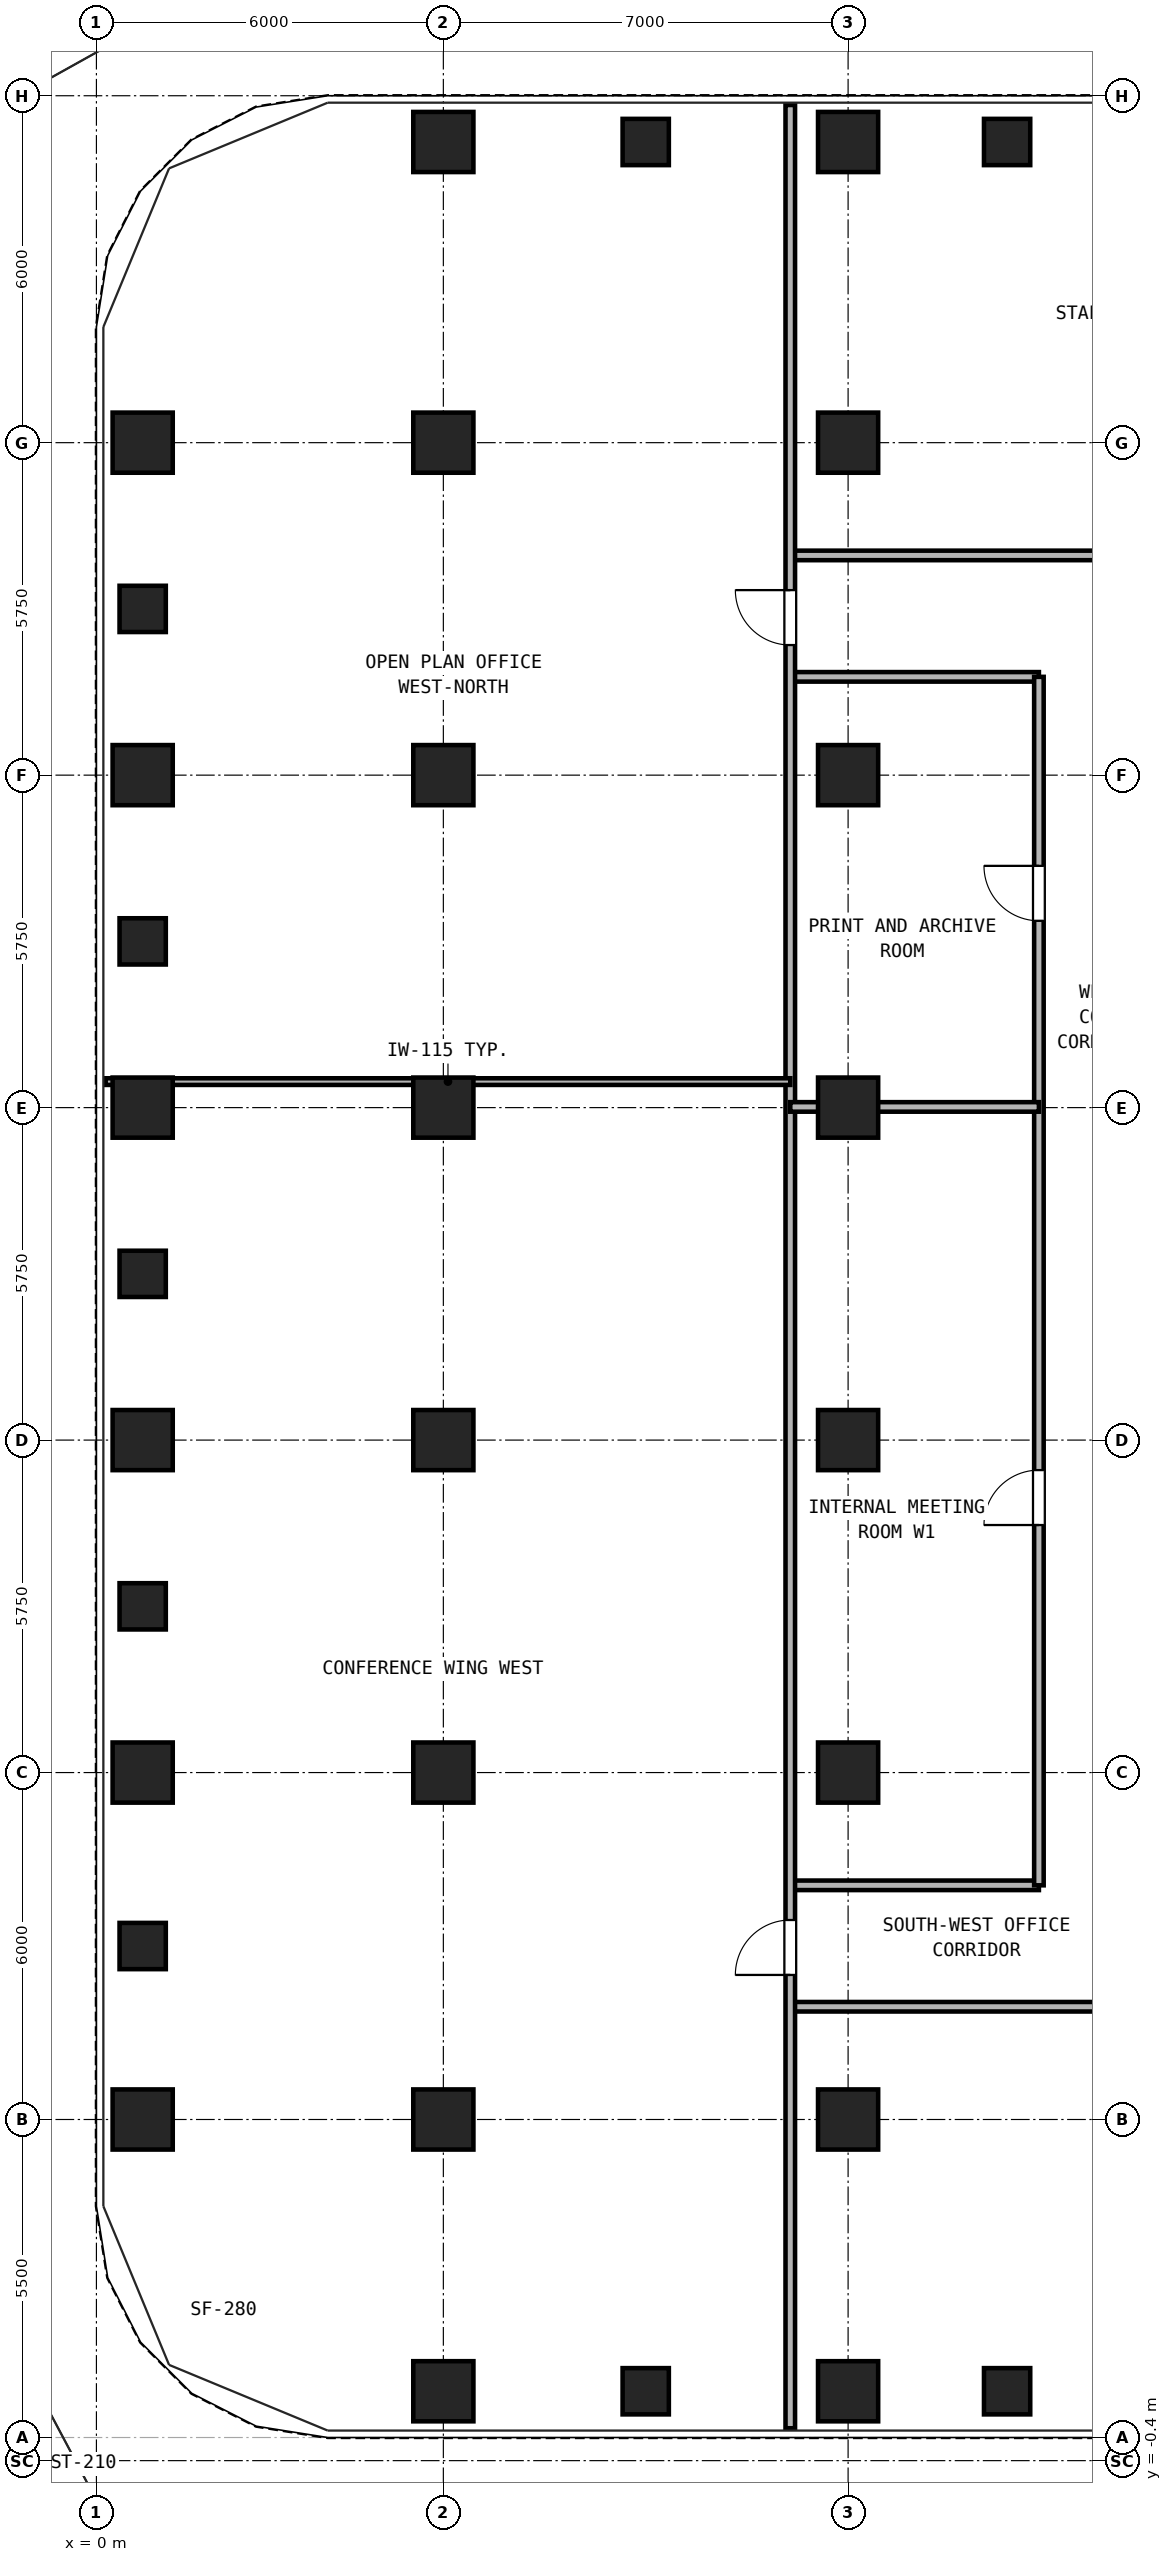
"""IFC4 building model, lengths in metres.
Left out: names, types, materials, properties, quantities, classifications, styles, units other than length and angle.
Written with IfcOpenShell. Run it as: python <this file> out.ifc"""

import sys

from ifc_helpers import new_model, si_unit, direction, frame, frame_2d, origin, origin_2d, place, context, subcontext, project, spatial, rectangle, hollow_rectangle, extrude, source, transform, mapped, element, fill, save


model = new_model("IFC4")
c1 = context("Model", 3, precision=1e-05, world=origin(), true_north=direction((0.0, 1.0)))
c2 = subcontext(c1, "Body", "Model", "MODEL_VIEW")
j1 = project(units=[si_unit("LENGTHUNIT", "METRE"), si_unit("PLANEANGLEUNIT", "RADIAN")], contexts=[c1])
p1 = place(None, origin())
s1 = spatial("IfcSite", under=j1, at=p1, CompositionType="ELEMENT")
p2 = place(p1, origin())
s2 = spatial("IfcBuilding", under=s1, at=p2, CompositionType="ELEMENT")
p3 = place(p2, frame((0.0, 0.0, 58.5)))
s3 = spatial("IfcBuildingStorey", under=s2, at=p3, CompositionType="ELEMENT", Elevation=58.5)
m1 = source(origin(), c2, "Body", "SweptSolid", [
    extrude(hollow_rectangle(XDim=1.04, YDim=1.04, WallThickness=0.065, at=origin_2d()), origin(), (0.0, 0.0, 1.0), 3.32),
])
for number, where, z_axis, x_axis in (
    (1, (6.0, 0.8, 0.0), (0.0, 0.0, 1.0), (1.0, 0.0, 0.0)),
    (2, (6.0, 39.7, 0.0), (0.0, 0.0, 1.0), (1.0, 0.0, 0.0)),
    (3, (13.0, 0.8, 0.0), (0.0, 0.0, 1.0), (1.0, 0.0, 0.0)),
    (4, (13.0, 39.7, 0.0), (0.0, 0.0, 1.0), (1.0, 0.0, 0.0)),
    (5, (0.8, 5.5, 0.0), (0.0, 0.0, 1.0), (1.0, 0.0, 0.0)),
    (6, (0.8, 11.5, 0.0), (0.0, 0.0, 1.0), (1.0, 0.0, 0.0)),
    (7, (0.8, 17.25, 0.0), (0.0, 0.0, 1.0), (1.0, 0.0, 0.0)),
    (8, (0.8, 23.0, 0.0), (0.0, 0.0, 1.0), (1.0, 0.0, 0.0)),
    (9, (0.8, 28.75, 0.0), (0.0, 0.0, 1.0), (1.0, 0.0, 0.0)),
    (10, (0.8, 34.5, 0.0), (0.0, 0.0, 1.0), (1.0, 0.0, 0.0)),
    (11, (6.0, 5.5, 0.0), (0.0, 0.0, 1.0), (1.0, 0.0, 0.0)),
    (12, (6.0, 11.5, 0.0), (0.0, 0.0, 1.0), (1.0, 0.0, 0.0)),
    (13, (6.0, 17.25, 0.0), (0.0, 0.0, 1.0), (1.0, 0.0, 0.0)),
    (14, (6.0, 23.0, 0.0), (0.0, 0.0, 1.0), (1.0, 0.0, 0.0)),
    (15, (6.0, 28.75, 0.0), (0.0, 0.0, 1.0), (1.0, 0.0, 0.0)),
    (16, (6.0, 34.5, 0.0), (0.0, 0.0, 1.0), (1.0, 0.0, 0.0)),
    (17, (13.0, 5.5, 0.0), (0.0, 0.0, 1.0), (1.0, 0.0, 0.0)),
    (18, (13.0, 11.5, 0.0), (0.0, 0.0, 1.0), (1.0, 0.0, 0.0)),
    (19, (13.0, 17.25, 0.0), (0.0, 0.0, 1.0), (1.0, 0.0, 0.0)),
    (20, (13.0, 23.0, 0.0), (0.0, 0.0, 1.0), (1.0, 0.0, 0.0)),
    (21, (13.0, 28.75, 0.0), (0.0, 0.0, 1.0), (1.0, 0.0, 0.0)),
    (22, (13.0, 34.5, 0.0), (0.0, 0.0, 1.0), (1.0, 0.0, 0.0)),
):
    element("IfcColumn", number, at=place(p3, frame(where, z_axis=z_axis, x_axis=x_axis)), inside=s3, PredefinedType="COLUMN", context=c2, shape_type="MappedRepresentation", body=[
        mapped(m1, transform((0.0, 0.0, 0.0), x_axis=(1.0, 0.0, 0.0), y_axis=(0.0, 1.0, 0.0), z_axis=(0.0, 0.0, 1.0), scale=1.0)),
    ])
m2 = source(origin(), c2, "Body", "SweptSolid", [
    extrude(hollow_rectangle(XDim=0.8, YDim=0.8, WallThickness=0.045, at=origin_2d()), origin(), (0.0, 0.0, 1.0), 3.32),
])
for number, where, z_axis, x_axis in (
    (23, (9.5, 0.8, 0.0), (0.0, 0.0, 1.0), (1.0, 0.0, 0.0)),
    (24, (9.5, 39.7, 0.0), (0.0, 0.0, 1.0), (1.0, 0.0, 0.0)),
    (25, (15.75, 0.8, 0.0), (0.0, 0.0, 1.0), (1.0, 0.0, 0.0)),
    (26, (15.75, 39.7, 0.0), (0.0, 0.0, 1.0), (1.0, 0.0, 0.0)),
    (27, (0.8, 8.5, 0.0), (0.0, 0.0, 1.0), (1.0, 0.0, 0.0)),
    (28, (0.8, 14.375, 0.0), (0.0, 0.0, 1.0), (1.0, 0.0, 0.0)),
    (29, (0.8, 20.125, 0.0), (0.0, 0.0, 1.0), (1.0, 0.0, 0.0)),
    (30, (0.8, 25.875, 0.0), (0.0, 0.0, 1.0), (1.0, 0.0, 0.0)),
    (31, (0.8, 31.625, 0.0), (0.0, 0.0, 1.0), (1.0, 0.0, 0.0)),
):
    element("IfcColumn", number, at=place(p3, frame(where, z_axis=z_axis, x_axis=x_axis)), inside=s3, PredefinedType="COLUMN", context=c2, shape_type="MappedRepresentation", body=[
        mapped(m2, transform((0.0, 0.0, 0.0), x_axis=(1.0, 0.0, 0.0), y_axis=(0.0, 1.0, 0.0), z_axis=(0.0, 0.0, 1.0), scale=1.0)),
    ])
p4 = place(p3, frame((12.0, 7.45, 0.0), z_axis=(0.0, 0.0, 1.0), x_axis=(1.0, 0.0, 0.0)))
e32 = element("IfcWall", 32, at=p4, inside=s3, PredefinedType="PARTITIONING", context=c2, shape_type="SweptSolid", body=[
    extrude(rectangle(XDim=23.0, YDim=0.165, at=frame_2d((11.5, 0.0))), origin(), (0.0, 0.0, 1.0), 3.32),
])
p5 = place(p4, frame((7.5, 0.0, 0.0)))
e33 = element("IfcOpeningElement", 33, at=p5, cuts=e32, PredefinedType="OPENING", context=c2, shape_type="SweptSolid", body=[
    extrude(rectangle(XDim=0.95, YDim=2.15, at=frame_2d((0.475, 1.075))), frame((0.0, 0.093, 0.0), z_axis=(0.0, -1.0, 0.0), x_axis=(1.0, 0.0, 0.0)), (0.0, 0.0, 1.0), 0.185),
])
p6 = place(p4, frame((17.9, 0.0, 0.0)))
e34 = element("IfcOpeningElement", 34, at=p6, cuts=e32, PredefinedType="OPENING", context=c2, shape_type="SweptSolid", body=[
    extrude(rectangle(XDim=0.95, YDim=2.15, at=frame_2d((0.475, 1.075))), frame((0.0, 0.093, 0.0), z_axis=(0.0, -1.0, 0.0), x_axis=(1.0, 0.0, 0.0)), (0.0, 0.0, 1.0), 0.185),
])
p7 = place(p4, frame((21.4, 0.0, 0.0)))
e35 = element("IfcOpeningElement", 35, at=p7, cuts=e32, PredefinedType="OPENING", context=c2, shape_type="SweptSolid", body=[
    extrude(rectangle(XDim=0.92, YDim=2.1, at=frame_2d((0.46, 1.05))), frame((0.0, 0.093, 0.0), z_axis=(0.0, -1.0, 0.0), x_axis=(1.0, 0.0, 0.0)), (0.0, 0.0, 1.0), 0.185),
])
p8 = place(p3, frame((12.0, 32.55, 0.0), z_axis=(0.0, 0.0, 1.0), x_axis=(1.0, 0.0, 0.0)))
e36 = element("IfcWall", 36, at=p8, inside=s3, PredefinedType="PARTITIONING", context=c2, shape_type="SweptSolid", body=[
    extrude(rectangle(XDim=23.0, YDim=0.165, at=frame_2d((11.5, 0.0))), origin(), (0.0, 0.0, 1.0), 3.32),
])
p9 = place(p8, frame((5.75, 0.0, 0.0)))
e37 = element("IfcOpeningElement", 37, at=p9, cuts=e36, PredefinedType="OPENING", context=c2, shape_type="SweptSolid", body=[
    extrude(rectangle(XDim=0.95, YDim=2.15, at=frame_2d((0.475, 1.075))), frame((0.0, 0.093, 0.0), z_axis=(0.0, -1.0, 0.0), x_axis=(1.0, 0.0, 0.0)), (0.0, 0.0, 1.0), 0.185),
])
p10 = place(p8, frame((17.25, 0.0, 0.0)))
e38 = element("IfcOpeningElement", 38, at=p10, cuts=e36, PredefinedType="OPENING", context=c2, shape_type="SweptSolid", body=[
    extrude(rectangle(XDim=0.95, YDim=2.15, at=frame_2d((0.475, 1.075))), frame((0.0, 0.093, 0.0), z_axis=(0.0, -1.0, 0.0), x_axis=(1.0, 0.0, 0.0)), (0.0, 0.0, 1.0), 0.185),
])
for number, where, z_axis, x_axis in (
    (39, (12.0, 9.55, 0.0), (0.0, 0.0, 1.0), (1.0, 0.0, 0.0)),
    (40, (12.0, 30.45, 0.0), (0.0, 0.0, 1.0), (1.0, 0.0, 0.0)),
):
    element("IfcWall", number, at=place(p3, frame(where, z_axis=z_axis, x_axis=x_axis)), inside=s3, PredefinedType="PARTITIONING", context=c2, shape_type="SweptSolid", body=[
        extrude(rectangle(XDim=4.3, YDim=0.165, at=frame_2d((2.15, 0.0))), origin(), (0.0, 0.0, 1.0), 3.32),
    ])
p11 = place(p3, frame((16.3, 9.55, 0.0), z_axis=(0.0, 0.0, 1.0), x_axis=(0.0, 1.0, 0.0)))
e41 = element("IfcWall", 41, at=p11, inside=s3, PredefinedType="PARTITIONING", context=c2, shape_type="SweptSolid", body=[
    extrude(rectangle(XDim=20.9, YDim=0.165, at=frame_2d((10.45, 0.0))), origin(), (0.0, 0.0, 1.0), 3.32),
])
p12 = place(p11, frame((6.231, 0.0, 0.0)))
e42 = element("IfcOpeningElement", 42, at=p12, cuts=e41, PredefinedType="OPENING", context=c2, shape_type="SweptSolid", body=[
    extrude(rectangle(XDim=0.95, YDim=2.15, at=frame_2d((0.475, 1.075))), frame((0.0, 0.093, 0.0), z_axis=(0.0, -1.0, 0.0), x_axis=(1.0, 0.0, 0.0)), (0.0, 0.0, 1.0), 0.185),
])
p13 = place(p11, frame((16.681, 0.0, 0.0)))
e43 = element("IfcOpeningElement", 43, at=p13, cuts=e41, PredefinedType="OPENING", context=c2, shape_type="SweptSolid", body=[
    extrude(rectangle(XDim=0.95, YDim=2.15, at=frame_2d((0.475, 1.075))), frame((0.0, 0.093, 0.0), z_axis=(0.0, -1.0, 0.0), x_axis=(1.0, 0.0, 0.0)), (0.0, 0.0, 1.0), 0.185),
])
p14 = place(p3, frame((12.0, 0.16, 0.0), z_axis=(0.0, 0.0, 1.0), x_axis=(0.0, 1.0, 0.0)))
e44 = element("IfcWall", 44, at=p14, inside=s3, PredefinedType="PARTITIONING", context=c2, shape_type="SweptSolid", body=[
    extrude(rectangle(XDim=40.18, YDim=0.165, at=frame_2d((20.09, 0.0))), origin(), (0.0, 0.0, 1.0), 3.32),
])
p15 = place(p14, frame((7.84, 0.0, 0.0)))
e45 = element("IfcOpeningElement", 45, at=p15, cuts=e44, PredefinedType="OPENING", context=c2, shape_type="SweptSolid", body=[
    extrude(rectangle(XDim=0.95, YDim=2.15, at=frame_2d((0.475, 1.075))), frame((0.0, 0.093, 0.0), z_axis=(0.0, -1.0, 0.0), x_axis=(1.0, 0.0, 0.0)), (0.0, 0.0, 1.0), 0.185),
])
p16 = place(p14, frame((30.84, 0.0, 0.0)))
e46 = element("IfcOpeningElement", 46, at=p16, cuts=e44, PredefinedType="OPENING", context=c2, shape_type="SweptSolid", body=[
    extrude(rectangle(XDim=0.95, YDim=2.15, at=frame_2d((0.475, 1.075))), frame((0.0, 0.093, 0.0), z_axis=(0.0, -1.0, 0.0), x_axis=(1.0, 0.0, 0.0)), (0.0, 0.0, 1.0), 0.185),
])
p17 = place(p3, frame((0.16, 23.45, 0.0), z_axis=(0.0, 0.0, 1.0), x_axis=(1.0, 0.0, 0.0)))
e47 = element("IfcWall", 47, at=p17, inside=s3, PredefinedType="PARTITIONING", context=c2, shape_type="SweptSolid", body=[
    extrude(rectangle(XDim=11.84, YDim=0.115, at=frame_2d((5.92, 0.0))), origin(), (0.0, 0.0, 1.0), 3.32),
])
p18 = place(p3, frame((12.0, 23.012, 0.0), z_axis=(0.0, 0.0, 1.0), x_axis=(1.0, 0.0, 0.0)))
e48 = element("IfcWall", 48, at=p18, inside=s3, PredefinedType="PARTITIONING", context=c2, shape_type="SweptSolid", body=[
    extrude(rectangle(XDim=4.3, YDim=0.165, at=frame_2d((2.15, 0.0))), origin(), (0.0, 0.0, 1.0), 2.539),
])
p19 = place(p15, frame((0.95, 0.0, 0.0), z_axis=(0.0, 0.0, 1.0), x_axis=(-1.0, 0.0, 0.0)))
e49 = element("IfcDoor", 49, at=p19, inside=s3, OperationType="SINGLE_SWING_LEFT", PredefinedType="DOOR", context=c2, shape_type="SweptSolid", body=[
    extrude(rectangle(XDim=0.95, YDim=2.15, at=frame_2d((0.475, 1.075))), frame((0.0, 0.025, 0.0), z_axis=(0.0, -1.0, 0.0), x_axis=(1.0, 0.0, 0.0)), (0.0, 0.0, 1.0), 0.05),
])
fill(e45, e49)
p20 = place(p16, frame((0.95, 0.0, 0.0), z_axis=(0.0, 0.0, 1.0), x_axis=(-1.0, 0.0, 0.0)))
e50 = element("IfcDoor", 50, at=p20, inside=s3, OperationType="SINGLE_SWING_RIGHT", PredefinedType="DOOR", context=c2, shape_type="SweptSolid", body=[
    extrude(rectangle(XDim=0.95, YDim=2.15, at=frame_2d((0.475, 1.075))), frame((0.0, 0.025, 0.0), z_axis=(0.0, -1.0, 0.0), x_axis=(1.0, 0.0, 0.0)), (0.0, 0.0, 1.0), 0.05),
])
fill(e46, e50)
p21 = place(p12, frame((0.95, 0.0, 0.0), z_axis=(0.0, 0.0, 1.0), x_axis=(-1.0, 0.0, 0.0)))
e51 = element("IfcDoor", 51, at=p21, inside=s3, OperationType="SINGLE_SWING_LEFT", PredefinedType="DOOR", context=c2, shape_type="SweptSolid", body=[
    extrude(rectangle(XDim=0.95, YDim=2.15, at=frame_2d((0.475, 1.075))), frame((0.0, 0.025, 0.0), z_axis=(0.0, -1.0, 0.0), x_axis=(1.0, 0.0, 0.0)), (0.0, 0.0, 1.0), 0.05),
])
fill(e42, e51)
p22 = place(p13, frame((0.95, 0.0, 0.0), z_axis=(0.0, 0.0, 1.0), x_axis=(-1.0, 0.0, 0.0)))
e52 = element("IfcDoor", 52, at=p22, inside=s3, OperationType="SINGLE_SWING_RIGHT", PredefinedType="DOOR", context=c2, shape_type="SweptSolid", body=[
    extrude(rectangle(XDim=0.95, YDim=2.15, at=frame_2d((0.475, 1.075))), frame((0.0, 0.025, 0.0), z_axis=(0.0, -1.0, 0.0), x_axis=(1.0, 0.0, 0.0)), (0.0, 0.0, 1.0), 0.05),
])
fill(e43, e52)
save(model, sys.argv[1])
